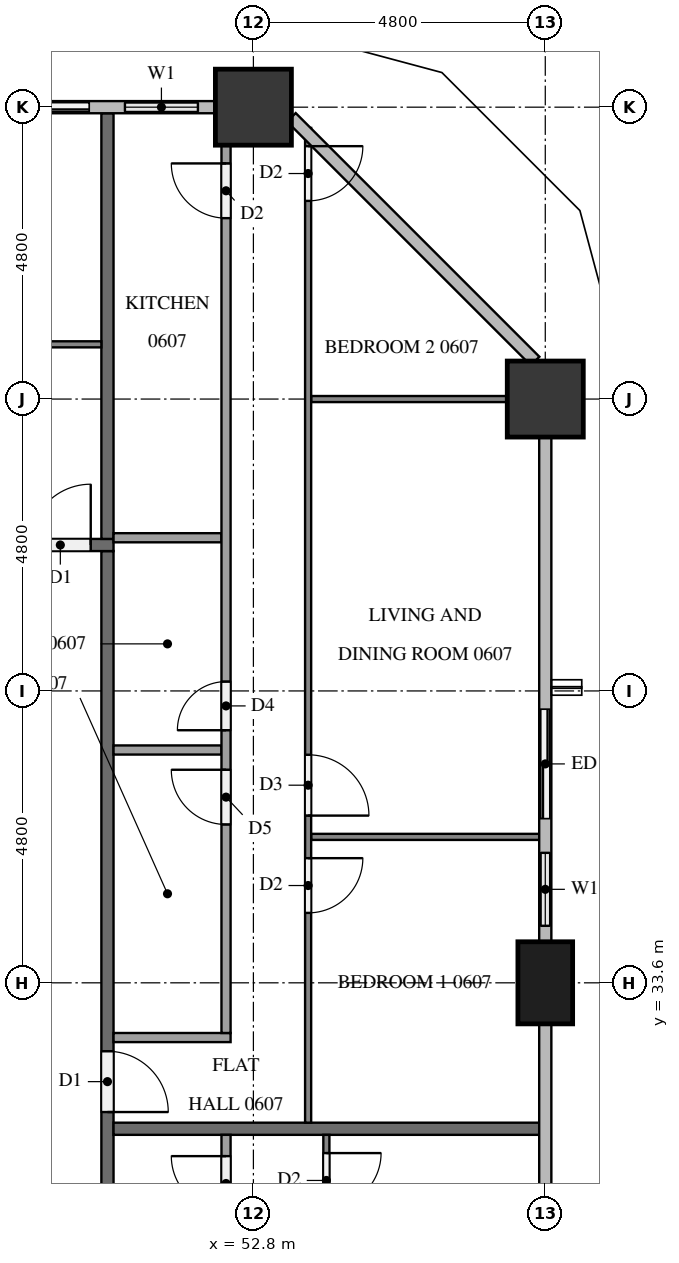
"""IFC4 building model, lengths in metres.
Left out: names, types, materials, properties, quantities, classifications, styles, units other than length and angle.
Written with IfcOpenShell. Run it as: python <this file> out.ifc"""

import sys

from ifc_helpers import new_model, si_unit, direction, frame, frame_2d, origin, origin_2d, place, context, subcontext, project, spatial, rectangle, extrude, element, fill, save


model = new_model("IFC4")
c1 = context("Model", 3, precision=1e-05, world=origin(), true_north=direction((0.0, 1.0)))
c2 = subcontext(c1, "Body", "Model", "MODEL_VIEW")
j1 = project(units=[si_unit("LENGTHUNIT", "METRE"), si_unit("PLANEANGLEUNIT", "RADIAN")], contexts=[c1])
p1 = place(None, origin())
s1 = spatial("IfcSite", under=j1, at=p1, CompositionType="ELEMENT")
p2 = place(p1, origin())
s2 = spatial("IfcBuilding", under=s1, at=p2, CompositionType="ELEMENT")
p3 = place(p2, frame((0.0, 0.0, 29.4)))
s3 = spatial("IfcBuildingStorey", under=s2, at=p3, CompositionType="ELEMENT", Elevation=29.4)
p4 = place(p3, frame((57.6, 33.6, 0.0), z_axis=(0.0, 0.0, 1.0), x_axis=(0.0, 1.0, 0.0)))
e1 = element("IfcColumn", 1, at=p4, inside=s3, PredefinedType="COLUMN", context=c2, shape_type="SweptSolid", body=[
    extrude(rectangle(XDim=1.35, YDim=0.9, at=origin_2d()), origin(), (0.0, 0.0, 1.0), 3.2),
])
for number, where, z_axis, x_axis in (
    (2, (57.6, 43.2, 0.0), (0.0, 0.0, 1.0), (1.0, 0.0, 0.0)),
    (3, (52.8, 48.0, 0.0), (0.0, 0.0, 1.0), (1.0, 0.0, 0.0)),
):
    element("IfcColumn", number, at=place(p3, frame(where, z_axis=z_axis, x_axis=x_axis)), inside=s3, PredefinedType="COLUMN", context=c2, shape_type="SweptSolid", body=[
        extrude(rectangle(XDim=1.25, YDim=1.25, at=origin_2d()), origin(), (0.0, 0.0, 1.0), 3.2),
    ])
p5 = place(p3, frame((57.6, 34.275, 0.0), z_axis=(0.0, 0.0, 1.0), x_axis=(0.0, 1.0, 0.0)))
e4 = element("IfcWall", 4, at=p5, inside=s3, PredefinedType="SOLIDWALL", context=c2, shape_type="SweptSolid", body=[
    extrude(rectangle(XDim=4.125, YDim=0.15, at=frame_2d((2.062, 0.0))), origin(), (0.0, 0.0, 1.0), 3.2),
])
p6 = place(p5, frame((0.262, 0.0, 0.9)))
e5 = element("IfcOpeningElement", 5, at=p6, cuts=e4, PredefinedType="OPENING", context=c2, shape_type="SweptSolid", body=[
    extrude(rectangle(XDim=1.2, YDim=1.4, at=frame_2d((0.6, 0.7))), frame((0.0, 0.085, 0.0), z_axis=(0.0, -1.0, 0.0), x_axis=(1.0, 0.0, 0.0)), (0.0, 0.0, 1.0), 0.17),
])
p7 = place(p5, frame((2.025, 0.0, 0.0)))
e6 = element("IfcOpeningElement", 6, at=p7, cuts=e4, PredefinedType="OPENING", context=c2, shape_type="SweptSolid", body=[
    extrude(rectangle(XDim=1.8, YDim=2.4, at=frame_2d((0.9, 1.2))), frame((0.0, 0.085, 0.0), z_axis=(0.0, -1.0, 0.0), x_axis=(1.0, 0.0, 0.0)), (0.0, 0.0, 1.0), 0.17),
])
p8 = place(p3, frame((52.175, 48.0, 0.0), z_axis=(0.0, 0.0, 1.0), x_axis=(-1.0, 0.0, 0.0)))
e7 = element("IfcWall", 7, at=p8, inside=s3, PredefinedType="SOLIDWALL", context=c2, shape_type="SweptSolid", body=[
    extrude(rectangle(XDim=4.175, YDim=0.15, at=frame_2d((2.087, 0.0))), origin(), (0.0, 0.0, 1.0), 3.2),
])
p9 = place(p8, frame((0.288, 0.0, 0.9)))
e8 = element("IfcOpeningElement", 8, at=p9, cuts=e7, PredefinedType="OPENING", context=c2, shape_type="SweptSolid", body=[
    extrude(rectangle(XDim=1.2, YDim=1.4, at=frame_2d((0.6, 0.7))), frame((0.0, 0.085, 0.0), z_axis=(0.0, -1.0, 0.0), x_axis=(1.0, 0.0, 0.0)), (0.0, 0.0, 1.0), 0.17),
])
p10 = place(p8, frame((2.075, 0.0, 0.0)))
e9 = element("IfcOpeningElement", 9, at=p10, cuts=e7, PredefinedType="OPENING", context=c2, shape_type="SweptSolid", body=[
    extrude(rectangle(XDim=1.8, YDim=2.4, at=frame_2d((0.9, 1.2))), frame((0.0, 0.085, 0.0), z_axis=(0.0, -1.0, 0.0), x_axis=(1.0, 0.0, 0.0)), (0.0, 0.0, 1.0), 0.17),
])
p11 = place(p3, frame((50.4, 40.7, 0.0), z_axis=(0.0, 0.0, 1.0), x_axis=(0.0, -1.0, 0.0)))
e10 = element("IfcWall", 10, at=p11, inside=s3, PredefinedType="PARTITIONING", context=c2, shape_type="SweptSolid", body=[
    extrude(rectangle(XDim=28.6, YDim=0.2, at=frame_2d((14.3, 0.0))), origin(), (0.0, 0.0, 1.0), 3.2),
])
p12 = place(p11, frame((27.375, 0.0, 0.0)))
e11 = element("IfcOpeningElement", 11, at=p12, cuts=e10, PredefinedType="OPENING", context=c2, shape_type="SweptSolid", body=[
    extrude(rectangle(XDim=1.1, YDim=2.1, at=frame_2d((0.55, 1.05))), frame((0.0, 0.11, 0.0), z_axis=(0.0, -1.0, 0.0), x_axis=(1.0, 0.0, 0.0)), (0.0, 0.0, 1.0), 0.22),
])
p13 = place(p11, frame((8.225, 0.0, 0.0)))
e12 = element("IfcOpeningElement", 12, at=p13, cuts=e10, PredefinedType="OPENING", context=c2, shape_type="SweptSolid", body=[
    extrude(rectangle(XDim=1.0, YDim=2.1, at=frame_2d((0.5, 1.05))), frame((0.0, 0.11, 0.0), z_axis=(0.0, -1.0, 0.0), x_axis=(1.0, 0.0, 0.0)), (0.0, 0.0, 1.0), 0.22),
])
p14 = place(p3, frame((11.9, 40.8, 0.0), z_axis=(0.0, 0.0, 1.0), x_axis=(1.0, 0.0, 0.0)))
e13 = element("IfcWall", 13, at=p14, inside=s3, PredefinedType="PARTITIONING", context=c2, shape_type="SweptSolid", body=[
    extrude(rectangle(XDim=38.6, YDim=0.2, at=frame_2d((19.3, 0.0))), origin(), (0.0, 0.0, 1.0), 3.2),
])
p15 = place(p14, frame((37.225, 0.0, 0.0)))
e14 = element("IfcOpeningElement", 14, at=p15, cuts=e13, PredefinedType="OPENING", context=c2, shape_type="SweptSolid", body=[
    extrude(rectangle(XDim=1.0, YDim=2.1, at=frame_2d((0.5, 1.05))), frame((0.0, 0.11, 0.0), z_axis=(0.0, -1.0, 0.0), x_axis=(1.0, 0.0, 0.0)), (0.0, 0.0, 1.0), 0.22),
])
p16 = place(p14, frame((30.025, 0.0, 0.0)))
e15 = element("IfcOpeningElement", 15, at=p16, cuts=e13, PredefinedType="OPENING", context=c2, shape_type="SweptSolid", body=[
    extrude(rectangle(XDim=1.0, YDim=2.1, at=frame_2d((0.5, 1.05))), frame((0.0, 0.11, 0.0), z_axis=(0.0, -1.0, 0.0), x_axis=(1.0, 0.0, 0.0)), (0.0, 0.0, 1.0), 0.22),
])
p17 = place(p14, frame((2.725, 0.0, 0.0)))
e16 = element("IfcOpeningElement", 16, at=p17, cuts=e13, PredefinedType="OPENING", context=c2, shape_type="SweptSolid", body=[
    extrude(rectangle(XDim=1.1, YDim=2.1, at=frame_2d((0.55, 1.05))), frame((0.0, 0.11, 0.0), z_axis=(0.0, -1.0, 0.0), x_axis=(1.0, 0.0, 0.0)), (0.0, 0.0, 1.0), 0.22),
])
p18 = place(p14, frame((1.225, 0.0, 0.0)))
e17 = element("IfcOpeningElement", 17, at=p18, cuts=e13, PredefinedType="OPENING", context=c2, shape_type="SweptSolid", body=[
    extrude(rectangle(XDim=1.0, YDim=2.1, at=frame_2d((0.5, 1.05))), frame((0.0, 0.11, 0.0), z_axis=(0.0, -1.0, 0.0), x_axis=(1.0, 0.0, 0.0)), (0.0, 0.0, 1.0), 0.22),
])
for number, where, z_axis, x_axis in (
    (18, (50.5, 31.2, 0.0), (0.0, 0.0, 1.0), (1.0, 0.0, 0.0)),
    (19, (50.4, 40.9, 0.0), (0.0, 0.0, 1.0), (0.0, 1.0, 0.0)),
):
    element("IfcWall", number, at=place(p3, frame(where, z_axis=z_axis, x_axis=x_axis)), inside=s3, PredefinedType="PARTITIONING", context=c2, shape_type="SweptSolid", body=[
        extrude(rectangle(XDim=7.0, YDim=0.2, at=frame_2d((3.5, 0.0))), origin(), (0.0, 0.0, 1.0), 3.2),
    ])
p19 = place(p3, frame((54.0, 31.1, 0.0), z_axis=(0.0, 0.0, 1.0), x_axis=(0.0, -1.0, 0.0)))
e20 = element("IfcWall", 20, at=p19, inside=s3, PredefinedType="PARTITIONING", context=c2, shape_type="SweptSolid", body=[
    extrude(rectangle(XDim=19.0, YDim=0.1, at=frame_2d((9.5, 0.0))), origin(), (0.0, 0.0, 1.0), 3.2),
])
p20 = place(p19, frame((17.8, 0.0, 0.0)))
e21 = element("IfcOpeningElement", 21, at=p20, cuts=e20, PredefinedType="OPENING", context=c2, shape_type="SweptSolid", body=[
    extrude(rectangle(XDim=0.9, YDim=2.1, at=frame_2d((0.45, 1.05))), frame((0.0, 0.06, 0.0), z_axis=(0.0, -1.0, 0.0), x_axis=(1.0, 0.0, 0.0)), (0.0, 0.0, 1.0), 0.12),
])
p21 = place(p19, frame((9.85, 0.0, 0.0)))
e22 = element("IfcOpeningElement", 22, at=p21, cuts=e20, PredefinedType="OPENING", context=c2, shape_type="SweptSolid", body=[
    extrude(rectangle(XDim=0.9, YDim=2.1, at=frame_2d((0.45, 1.05))), frame((0.0, 0.06, 0.0), z_axis=(0.0, -1.0, 0.0), x_axis=(1.0, 0.0, 0.0)), (0.0, 0.0, 1.0), 0.12),
])
p22 = place(p19, frame((8.15, 0.0, 0.0)))
e23 = element("IfcOpeningElement", 23, at=p22, cuts=e20, PredefinedType="OPENING", context=c2, shape_type="SweptSolid", body=[
    extrude(rectangle(XDim=1.0, YDim=2.1, at=frame_2d((0.5, 1.05))), frame((0.0, 0.06, 0.0), z_axis=(0.0, -1.0, 0.0), x_axis=(1.0, 0.0, 0.0)), (0.0, 0.0, 1.0), 0.12),
])
p23 = place(p19, frame((0.3, 0.0, 0.0)))
e24 = element("IfcOpeningElement", 24, at=p23, cuts=e20, PredefinedType="OPENING", context=c2, shape_type="SweptSolid", body=[
    extrude(rectangle(XDim=0.9, YDim=2.1, at=frame_2d((0.45, 1.05))), frame((0.0, 0.06, 0.0), z_axis=(0.0, -1.0, 0.0), x_axis=(1.0, 0.0, 0.0)), (0.0, 0.0, 1.0), 0.12),
])
p24 = place(p3, frame((52.35, 13.575, 0.0), z_axis=(0.0, 0.0, 1.0), x_axis=(0.0, 1.0, 0.0)))
e25 = element("IfcWall", 25, at=p24, inside=s3, PredefinedType="PARTITIONING", context=c2, shape_type="SweptSolid", body=[
    extrude(rectangle(XDim=17.525, YDim=0.15, at=frame_2d((8.763, 0.0))), origin(), (0.0, 0.0, 1.0), 3.2),
])
p25 = place(p24, frame((0.3, 0.0, 0.0)))
e26 = element("IfcOpeningElement", 26, at=p25, cuts=e25, PredefinedType="OPENING", context=c2, shape_type="SweptSolid", body=[
    extrude(rectangle(XDim=0.9, YDim=2.1, at=frame_2d((0.45, 1.05))), frame((0.0, 0.085, 0.0), z_axis=(0.0, -1.0, 0.0), x_axis=(1.0, 0.0, 0.0)), (0.0, 0.0, 1.0), 0.17),
])
p26 = place(p24, frame((8.733, 0.0, 0.0)))
e27 = element("IfcOpeningElement", 27, at=p26, cuts=e25, PredefinedType="OPENING", context=c2, shape_type="SweptSolid", body=[
    extrude(rectangle(XDim=0.8, YDim=2.1, at=frame_2d((0.4, 1.05))), frame((0.0, 0.085, 0.0), z_axis=(0.0, -1.0, 0.0), x_axis=(1.0, 0.0, 0.0)), (0.0, 0.0, 1.0), 0.17),
])
p27 = place(p24, frame((10.183, 0.0, 0.0)))
e28 = element("IfcOpeningElement", 28, at=p27, cuts=e25, PredefinedType="OPENING", context=c2, shape_type="SweptSolid", body=[
    extrude(rectangle(XDim=0.8, YDim=2.1, at=frame_2d((0.4, 1.05))), frame((0.0, 0.085, 0.0), z_axis=(0.0, -1.0, 0.0), x_axis=(1.0, 0.0, 0.0)), (0.0, 0.0, 1.0), 0.17),
])
p28 = place(p24, frame((16.275, 0.0, 0.0)))
e29 = element("IfcOpeningElement", 29, at=p28, cuts=e25, PredefinedType="OPENING", context=c2, shape_type="SweptSolid", body=[
    extrude(rectangle(XDim=0.9, YDim=2.1, at=frame_2d((0.45, 1.05))), frame((0.0, 0.085, 0.0), z_axis=(0.0, -1.0, 0.0), x_axis=(1.0, 0.0, 0.0)), (0.0, 0.0, 1.0), 0.17),
])
p29 = place(p3, frame((53.75, 36.0, 0.0), z_axis=(0.0, 0.0, 1.0), x_axis=(1.0, 0.0, 0.0)))
e30 = element("IfcWall", 30, at=p29, inside=s3, PredefinedType="PARTITIONING", context=c2, shape_type="SweptSolid", body=[
    extrude(rectangle(XDim=3.75, YDim=0.1, at=frame_2d((1.875, 0.0))), origin(), (0.0, 0.0, 1.0), 3.2),
])
p30 = place(p3, frame((53.75, 43.2, 0.0), z_axis=(0.0, 0.0, 1.0), x_axis=(1.0, 0.0, 0.0)))
e31 = element("IfcWall", 31, at=p30, inside=s3, PredefinedType="PARTITIONING", context=c2, shape_type="SweptSolid", body=[
    extrude(rectangle(XDim=3.225, YDim=0.1, at=frame_2d((1.613, 0.0))), origin(), (0.0, 0.0, 1.0), 3.2),
])
p31 = place(p3, frame((53.7, 47.659, 0.0), z_axis=(0.0, 0.0, 1.0), x_axis=(0.0, -1.0, 0.0)))
e32 = element("IfcWall", 32, at=p31, inside=s3, PredefinedType="PARTITIONING", context=c2, shape_type="SweptSolid", body=[
    extrude(rectangle(XDim=16.359, YDim=0.1, at=frame_2d((8.179, 0.0))), origin(), (0.0, 0.0, 1.0), 3.2),
])
p32 = place(p31, frame((12.009, 0.0, 0.0)))
e33 = element("IfcOpeningElement", 33, at=p32, cuts=e32, PredefinedType="OPENING", context=c2, shape_type="SweptSolid", body=[
    extrude(rectangle(XDim=0.9, YDim=2.1, at=frame_2d((0.45, 1.05))), frame((0.0, 0.06, 0.0), z_axis=(0.0, -1.0, 0.0), x_axis=(1.0, 0.0, 0.0)), (0.0, 0.0, 1.0), 0.12),
])
p33 = place(p31, frame((10.309, 0.0, 0.0)))
e34 = element("IfcOpeningElement", 34, at=p33, cuts=e32, PredefinedType="OPENING", context=c2, shape_type="SweptSolid", body=[
    extrude(rectangle(XDim=1.0, YDim=2.1, at=frame_2d((0.5, 1.05))), frame((0.0, 0.06, 0.0), z_axis=(0.0, -1.0, 0.0), x_axis=(1.0, 0.0, 0.0)), (0.0, 0.0, 1.0), 0.12),
])
p34 = place(p31, frame((0.3, 0.0, 0.0)))
e35 = element("IfcOpeningElement", 35, at=p34, cuts=e32, PredefinedType="OPENING", context=c2, shape_type="SweptSolid", body=[
    extrude(rectangle(XDim=0.9, YDim=2.1, at=frame_2d((0.45, 1.05))), frame((0.0, 0.06, 0.0), z_axis=(0.0, -1.0, 0.0), x_axis=(1.0, 0.0, 0.0)), (0.0, 0.0, 1.0), 0.12),
])
for number, where, z_axis, x_axis in (
    (36, (50.5, 37.429, 0.0), (0.0, 0.0, 1.0), (1.0, 0.0, 0.0)),
    (37, (50.5, 40.919, 0.0), (0.0, 0.0, 1.0), (1.0, 0.0, 0.0)),
):
    element("IfcWall", number, at=place(p3, frame(where, z_axis=z_axis, x_axis=x_axis)), inside=s3, PredefinedType="PARTITIONING", context=c2, shape_type="SweptSolid", body=[
        extrude(rectangle(XDim=1.775, YDim=0.15, at=frame_2d((0.887, 0.0))), origin(), (0.0, 0.0, 1.0), 3.2),
    ])
p35 = place(p3, frame((50.5, 32.7, 0.0), z_axis=(0.0, 0.0, 1.0), x_axis=(1.0, 0.0, 0.0)))
e38 = element("IfcWall", 38, at=p35, inside=s3, PredefinedType="PARTITIONING", context=c2, shape_type="SweptSolid", body=[
    extrude(rectangle(XDim=1.925, YDim=0.15, at=frame_2d((0.962, 0.0))), origin(), (0.0, 0.0, 1.0), 3.2),
])
p36 = place(p3, frame((52.35, 32.775, 0.0), z_axis=(0.0, 0.0, 1.0), x_axis=(0.0, 1.0, 0.0)))
e39 = element("IfcWall", 39, at=p36, inside=s3, PredefinedType="PARTITIONING", context=c2, shape_type="SweptSolid", body=[
    extrude(rectangle(XDim=14.6, YDim=0.15, at=frame_2d((7.3, 0.0))), origin(), (0.0, 0.0, 1.0), 3.2),
])
p37 = place(p36, frame((3.429, 0.0, 0.0)))
e40 = element("IfcOpeningElement", 40, at=p37, cuts=e39, PredefinedType="OPENING", context=c2, shape_type="SweptSolid", body=[
    extrude(rectangle(XDim=0.9, YDim=2.1, at=frame_2d((0.45, 1.05))), frame((0.0, 0.085, 0.0), z_axis=(0.0, -1.0, 0.0), x_axis=(1.0, 0.0, 0.0)), (0.0, 0.0, 1.0), 0.17),
])
p38 = place(p36, frame((4.979, 0.0, 0.0)))
e41 = element("IfcOpeningElement", 41, at=p38, cuts=e39, PredefinedType="OPENING", context=c2, shape_type="SweptSolid", body=[
    extrude(rectangle(XDim=0.8, YDim=2.1, at=frame_2d((0.4, 1.05))), frame((0.0, 0.085, 0.0), z_axis=(0.0, -1.0, 0.0), x_axis=(1.0, 0.0, 0.0)), (0.0, 0.0, 1.0), 0.17),
])
p39 = place(p36, frame((13.4, 0.0, 0.0)))
e42 = element("IfcOpeningElement", 42, at=p39, cuts=e39, PredefinedType="OPENING", context=c2, shape_type="SweptSolid", body=[
    extrude(rectangle(XDim=0.9, YDim=2.1, at=frame_2d((0.45, 1.05))), frame((0.0, 0.085, 0.0), z_axis=(0.0, -1.0, 0.0), x_axis=(1.0, 0.0, 0.0)), (0.0, 0.0, 1.0), 0.17),
])
p40 = place(p3, frame((43.3, 44.1, 0.0), z_axis=(0.0, 0.0, 1.0), x_axis=(1.0, 0.0, 0.0)))
e43 = element("IfcWall", 43, at=p40, inside=s3, PredefinedType="PARTITIONING", context=c2, shape_type="SweptSolid", body=[
    extrude(rectangle(XDim=7.0, YDim=0.1, at=frame_2d((3.5, 0.0))), origin(), (0.0, 0.0, 1.0), 3.2),
])
p41 = place(p40, frame((0.3, 0.0, 0.0)))
e44 = element("IfcOpeningElement", 44, at=p41, cuts=e43, PredefinedType="OPENING", context=c2, shape_type="SweptSolid", body=[
    extrude(rectangle(XDim=1.0, YDim=2.1, at=frame_2d((0.5, 1.05))), frame((0.0, 0.06, 0.0), z_axis=(0.0, -1.0, 0.0), x_axis=(1.0, 0.0, 0.0)), (0.0, 0.0, 1.0), 0.12),
])
p42 = place(p6, origin())
e45 = element("IfcWindow", 45, at=p42, inside=s3, PartitioningType="SINGLE_PANEL", PredefinedType="WINDOW", context=c2, shape_type="SweptSolid", body=[
    extrude(rectangle(XDim=1.2, YDim=1.4, at=frame_2d((0.6, 0.7))), frame((0.0, 0.03, 0.0), z_axis=(0.0, -1.0, 0.0), x_axis=(1.0, 0.0, 0.0)), (0.0, 0.0, 1.0), 0.06),
])
fill(e5, e45)
p43 = place(p7, origin())
e46 = element("IfcDoor", 46, at=p43, inside=s3, OperationType="SLIDING_TO_RIGHT", PredefinedType="DOOR", context=c2, shape_type="SweptSolid", body=[
    extrude(rectangle(XDim=1.8, YDim=2.4, at=frame_2d((0.9, 1.2))), frame((0.0, 0.025, 0.0), z_axis=(0.0, -1.0, 0.0), x_axis=(1.0, 0.0, 0.0)), (0.0, 0.0, 1.0), 0.05),
])
fill(e6, e46)
p44 = place(p9, origin())
e47 = element("IfcWindow", 47, at=p44, inside=s3, PartitioningType="SINGLE_PANEL", PredefinedType="WINDOW", context=c2, shape_type="SweptSolid", body=[
    extrude(rectangle(XDim=1.2, YDim=1.4, at=frame_2d((0.6, 0.7))), frame((0.0, 0.03, 0.0), z_axis=(0.0, -1.0, 0.0), x_axis=(1.0, 0.0, 0.0)), (0.0, 0.0, 1.0), 0.06),
])
fill(e8, e47)
p45 = place(p10, origin())
e48 = element("IfcDoor", 48, at=p45, inside=s3, OperationType="SLIDING_TO_LEFT", PredefinedType="DOOR", context=c2, shape_type="SweptSolid", body=[
    extrude(rectangle(XDim=1.8, YDim=2.4, at=frame_2d((0.9, 1.2))), frame((0.0, 0.025, 0.0), z_axis=(0.0, -1.0, 0.0), x_axis=(1.0, 0.0, 0.0)), (0.0, 0.0, 1.0), 0.05),
])
fill(e9, e48)
p46 = place(p13, origin())
e49 = element("IfcDoor", 49, at=p46, inside=s3, OperationType="SINGLE_SWING_RIGHT", PredefinedType="DOOR", context=c2, shape_type="SweptSolid", body=[
    extrude(rectangle(XDim=1.0, YDim=2.1, at=frame_2d((0.5, 1.05))), frame((0.0, 0.025, 0.0), z_axis=(0.0, -1.0, 0.0), x_axis=(1.0, 0.0, 0.0)), (0.0, 0.0, 1.0), 0.05),
])
fill(e12, e49)
p47 = place(p15, origin())
e50 = element("IfcDoor", 50, at=p47, inside=s3, OperationType="SINGLE_SWING_RIGHT", PredefinedType="DOOR", context=c2, shape_type="SweptSolid", body=[
    extrude(rectangle(XDim=1.0, YDim=2.1, at=frame_2d((0.5, 1.05))), frame((0.0, 0.025, 0.0), z_axis=(0.0, -1.0, 0.0), x_axis=(1.0, 0.0, 0.0)), (0.0, 0.0, 1.0), 0.05),
])
fill(e14, e50)
p48 = place(p23, origin())
e51 = element("IfcDoor", 51, at=p48, inside=s3, OperationType="SINGLE_SWING_LEFT", PredefinedType="DOOR", context=c2, shape_type="SweptSolid", body=[
    extrude(rectangle(XDim=0.9, YDim=2.1, at=frame_2d((0.45, 1.05))), frame((0.0, 0.025, 0.0), z_axis=(0.0, -1.0, 0.0), x_axis=(1.0, 0.0, 0.0)), (0.0, 0.0, 1.0), 0.05),
])
fill(e24, e51)
p49 = place(p28, origin())
e52 = element("IfcDoor", 52, at=p49, inside=s3, OperationType="SINGLE_SWING_RIGHT", PredefinedType="DOOR", context=c2, shape_type="SweptSolid", body=[
    extrude(rectangle(XDim=0.9, YDim=2.1, at=frame_2d((0.45, 1.05))), frame((0.0, 0.025, 0.0), z_axis=(0.0, -1.0, 0.0), x_axis=(1.0, 0.0, 0.0)), (0.0, 0.0, 1.0), 0.05),
])
fill(e29, e52)
p50 = place(p32, origin())
e53 = element("IfcDoor", 53, at=p50, inside=s3, OperationType="SINGLE_SWING_LEFT", PredefinedType="DOOR", context=c2, shape_type="SweptSolid", body=[
    extrude(rectangle(XDim=0.9, YDim=2.1, at=frame_2d((0.45, 1.05))), frame((0.0, 0.025, 0.0), z_axis=(0.0, -1.0, 0.0), x_axis=(1.0, 0.0, 0.0)), (0.0, 0.0, 1.0), 0.05),
])
fill(e33, e53)
p51 = place(p33, origin())
e54 = element("IfcDoor", 54, at=p51, inside=s3, OperationType="SINGLE_SWING_RIGHT", PredefinedType="DOOR", context=c2, shape_type="SweptSolid", body=[
    extrude(rectangle(XDim=1.0, YDim=2.1, at=frame_2d((0.5, 1.05))), frame((0.0, 0.025, 0.0), z_axis=(0.0, -1.0, 0.0), x_axis=(1.0, 0.0, 0.0)), (0.0, 0.0, 1.0), 0.05),
])
fill(e34, e54)
p52 = place(p34, origin())
e55 = element("IfcDoor", 55, at=p52, inside=s3, OperationType="SINGLE_SWING_LEFT", PredefinedType="DOOR", context=c2, shape_type="SweptSolid", body=[
    extrude(rectangle(XDim=0.9, YDim=2.1, at=frame_2d((0.45, 1.05))), frame((0.0, 0.025, 0.0), z_axis=(0.0, -1.0, 0.0), x_axis=(1.0, 0.0, 0.0)), (0.0, 0.0, 1.0), 0.05),
])
fill(e35, e55)
p53 = place(p37, origin())
e56 = element("IfcDoor", 56, at=p53, inside=s3, OperationType="SINGLE_SWING_RIGHT", PredefinedType="DOOR", context=c2, shape_type="SweptSolid", body=[
    extrude(rectangle(XDim=0.9, YDim=2.1, at=frame_2d((0.45, 1.05))), frame((0.0, 0.025, 0.0), z_axis=(0.0, -1.0, 0.0), x_axis=(1.0, 0.0, 0.0)), (0.0, 0.0, 1.0), 0.05),
])
fill(e40, e56)
p54 = place(p38, origin())
e57 = element("IfcDoor", 57, at=p54, inside=s3, OperationType="SINGLE_SWING_LEFT", PredefinedType="DOOR", context=c2, shape_type="SweptSolid", body=[
    extrude(rectangle(XDim=0.8, YDim=2.1, at=frame_2d((0.4, 1.05))), frame((0.0, 0.025, 0.0), z_axis=(0.0, -1.0, 0.0), x_axis=(1.0, 0.0, 0.0)), (0.0, 0.0, 1.0), 0.05),
])
fill(e41, e57)
p55 = place(p39, origin())
e58 = element("IfcDoor", 58, at=p55, inside=s3, OperationType="SINGLE_SWING_RIGHT", PredefinedType="DOOR", context=c2, shape_type="SweptSolid", body=[
    extrude(rectangle(XDim=0.9, YDim=2.1, at=frame_2d((0.45, 1.05))), frame((0.0, 0.025, 0.0), z_axis=(0.0, -1.0, 0.0), x_axis=(1.0, 0.0, 0.0)), (0.0, 0.0, 1.0), 0.05),
])
fill(e42, e58)
save(model, sys.argv[1])
